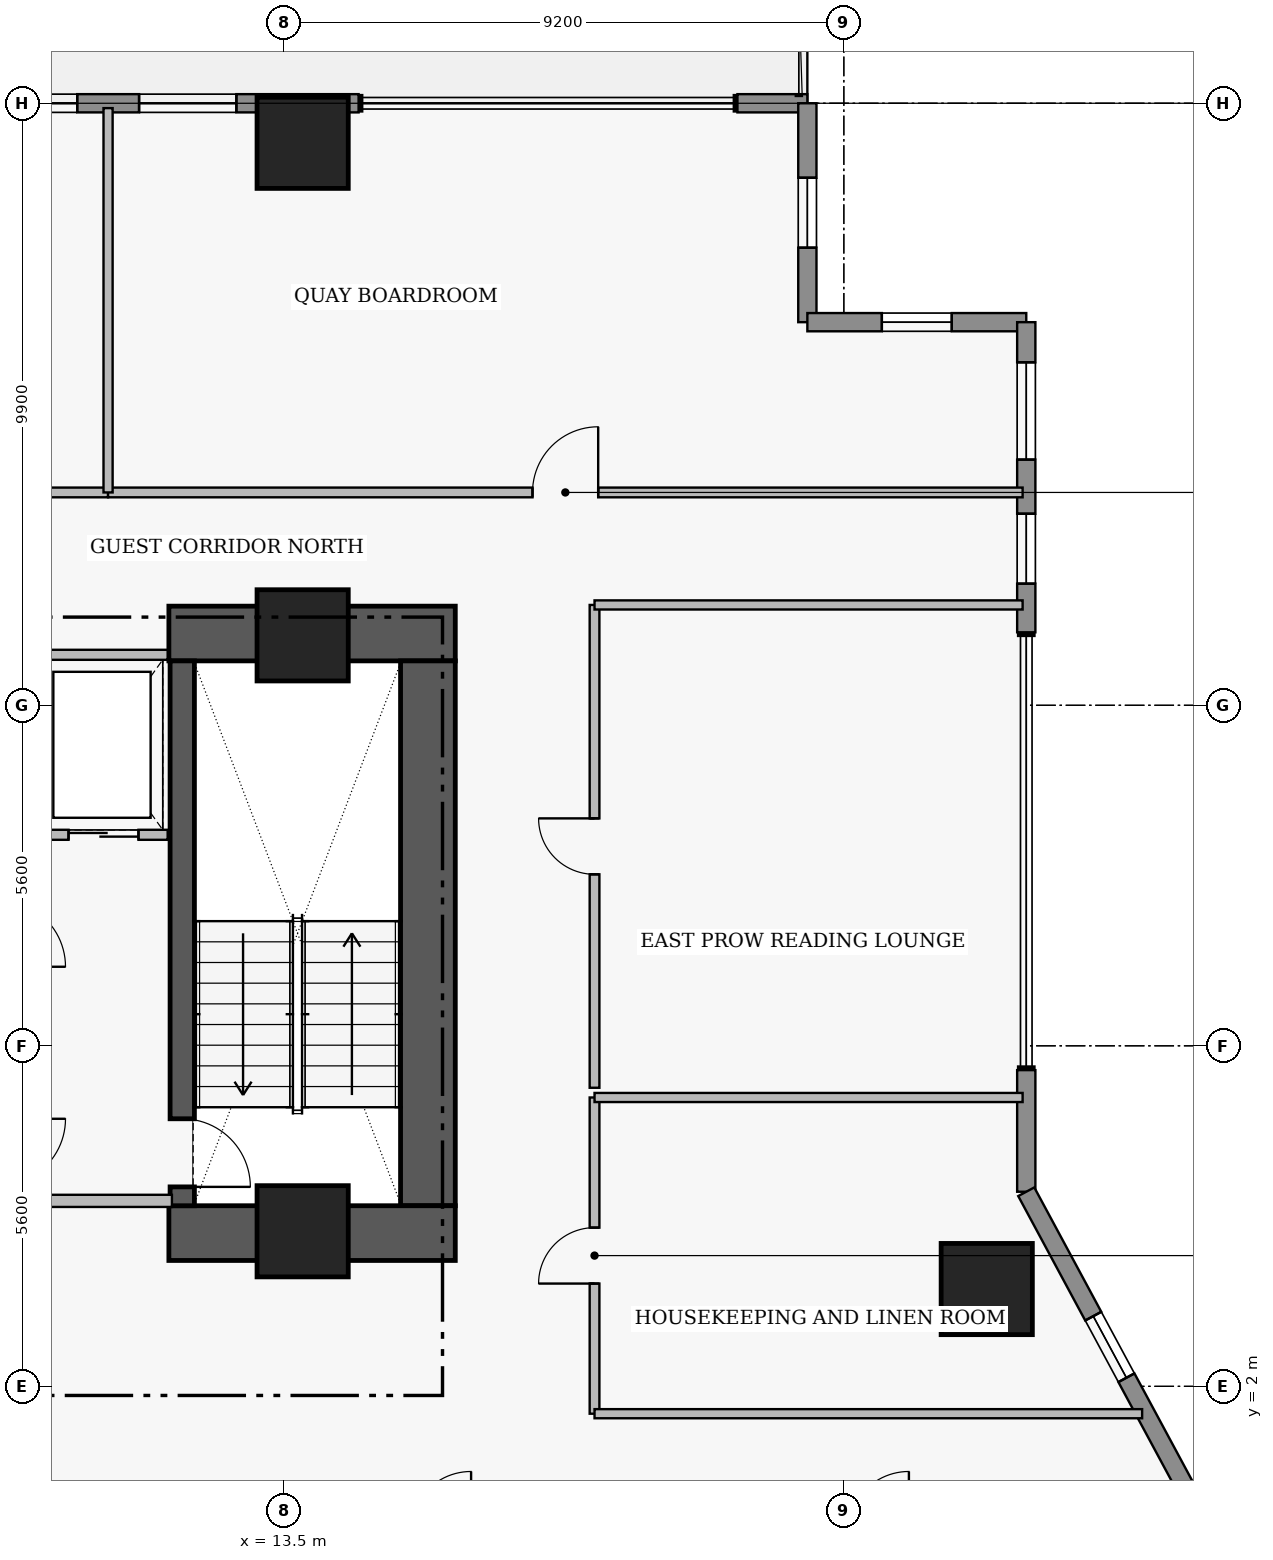
"""IFC4 building model, lengths in metres.
Left out: names, types, materials, properties, quantities, classifications, styles, units other than length and angle.
Written with IfcOpenShell. Run it as: python <this file> out.ifc"""

import sys

from ifc_helpers import new_model, si_unit, direction, frame, frame_2d, origin, origin_2d, place, context, subcontext, project, spatial, rectangle, extrude, element, fill, save


model = new_model("IFC4")
c1 = context("Model", 3, precision=1e-05, world=origin(), true_north=direction((0.0, 1.0)))
c2 = subcontext(c1, "Body", "Model", "MODEL_VIEW")
j1 = project(units=[si_unit("LENGTHUNIT", "METRE"), si_unit("PLANEANGLEUNIT", "RADIAN")], contexts=[c1])
p1 = place(None, origin())
s1 = spatial("IfcSite", under=j1, at=p1, CompositionType="ELEMENT")
p2 = place(p1, origin())
s2 = spatial("IfcBuilding", under=s1, at=p2, CompositionType="ELEMENT")
p3 = place(p2, frame((0.0, 0.0, 38.55)))
s3 = spatial("IfcBuildingStorey", under=s2, at=p3, CompositionType="ELEMENT", Elevation=38.55)
p4 = place(p3, frame((11.6, 14.38, 0.0), z_axis=(0.0, 0.0, 1.0), x_axis=(1.0, 0.0, 0.0)))
e1 = element("IfcWall", 1, at=p4, inside=s3, PredefinedType="SHEAR", context=c2, shape_type="SweptSolid", body=[
    extrude(rectangle(XDim=4.71, YDim=0.9, at=frame_2d((2.355, 0.0))), origin(), (0.0, 0.0, 1.0), 3.46),
])
p5 = place(p3, frame((15.86, 4.97, 0.0), z_axis=(0.0, 0.0, 1.0), x_axis=(0.0, 1.0, 0.0)))
e2 = element("IfcWall", 2, at=p5, inside=s3, PredefinedType="SHEAR", context=c2, shape_type="SweptSolid", body=[
    extrude(rectangle(XDim=8.96, YDim=0.9, at=frame_2d((4.48, 0.0))), origin(), (0.0, 0.0, 1.0), 3.46),
])
p6 = place(p3, frame((11.6, 4.52, 0.0), z_axis=(0.0, 0.0, 1.0), x_axis=(1.0, 0.0, 0.0)))
e3 = element("IfcWall", 3, at=p6, inside=s3, PredefinedType="SHEAR", context=c2, shape_type="SweptSolid", body=[
    extrude(rectangle(XDim=4.71, YDim=0.9, at=frame_2d((2.355, 0.0))), origin(), (0.0, 0.0, 1.0), 3.46),
])
p7 = place(p3, frame((11.82, 13.93, 0.0), z_axis=(0.0, 0.0, 1.0), x_axis=(0.0, -1.0, 0.0)))
e4 = element("IfcWall", 4, at=p7, inside=s3, PredefinedType="SHEAR", context=c2, shape_type="SweptSolid", body=[
    extrude(rectangle(XDim=8.96, YDim=0.4, at=frame_2d((4.48, 0.0))), origin(), (0.0, 0.0, 1.0), 3.46),
])
p8 = place(p7, frame((7.53, 0.0, 0.0)))
e5 = element("IfcOpeningElement", 5, at=p8, cuts=e4, PredefinedType="OPENING", context=c2, shape_type="SweptSolid", body=[
    extrude(rectangle(XDim=1.12, YDim=2.22, at=frame_2d((0.56, 1.11))), frame((0.0, 0.21, 0.0), z_axis=(0.0, -1.0, 0.0), x_axis=(1.0, 0.0, 0.0)), (0.0, 0.0, 1.0), 0.42),
])
for number, where, z_axis, x_axis in (
    (6, (13.8, 14.35, 0.0), (0.0, 0.0, 1.0), (1.0, 0.0, 0.0)),
    (7, (13.8, 4.55, 0.0), (0.0, 0.0, 1.0), (1.0, 0.0, 0.0)),
    (8, (13.8, 22.45, 0.0), (0.0, 0.0, 1.0), (1.0, 0.0, 0.0)),
    (9, (25.05, 3.6, 0.0), (0.0, 0.0, 1.0), (1.0, 0.0, 0.0)),
):
    element("IfcColumn", number, at=place(p3, frame(where, z_axis=z_axis, x_axis=x_axis)), inside=s3, PredefinedType="COLUMN", context=c2, shape_type="SweptSolid", body=[
        extrude(rectangle(XDim=1.5, YDim=1.5, at=origin_2d()), origin(), (0.0, 0.0, 1.0), 3.65),
    ])
p9 = place(p3, frame((-5.52, 23.1, 0.0), z_axis=(0.0, 0.0, 1.0), x_axis=(1.0, 0.0, 0.0)))
e10 = element("IfcWall", 10, at=p9, inside=s3, PredefinedType="STANDARD", context=c2, shape_type="SweptSolid", body=[
    extrude(rectangle(XDim=20.24, YDim=0.3, at=frame_2d((10.12, 0.0))), origin(), (0.0, 0.0, 1.0), 3.43),
])
p10 = place(p9, frame((12.775, 0.0, 0.0)))
e11 = element("IfcOpeningElement", 11, at=p10, cuts=e10, PredefinedType="OPENING", context=c2, shape_type="SweptSolid", body=[
    extrude(rectangle(XDim=1.05, YDim=2.2, at=frame_2d((0.525, 1.1))), frame((0.0, 0.16, 0.0), z_axis=(0.0, -1.0, 0.0), x_axis=(1.0, 0.0, 0.0)), (0.0, 0.0, 1.0), 0.32),
])
p11 = place(p9, frame((2.92, 0.0, 0.85)))
e12 = element("IfcOpeningElement", 12, at=p11, cuts=e10, PredefinedType="OPENING", context=c2, shape_type="SweptSolid", body=[
    extrude(rectangle(XDim=1.6, YDim=1.8, at=frame_2d((0.8, 0.9))), frame((0.0, 0.16, 0.0), z_axis=(0.0, -1.0, 0.0), x_axis=(1.0, 0.0, 0.0)), (0.0, 0.0, 1.0), 0.32),
])
p12 = place(p9, frame((5.11, 0.0, 0.95)))
e13 = element("IfcOpeningElement", 13, at=p12, cuts=e10, PredefinedType="OPENING", context=c2, shape_type="SweptSolid", body=[
    extrude(rectangle(XDim=1.15, YDim=1.55, at=frame_2d((0.575, 0.775))), frame((0.0, 0.16, 0.0), z_axis=(0.0, -1.0, 0.0), x_axis=(1.0, 0.0, 0.0)), (0.0, 0.0, 1.0), 0.32),
])
p13 = place(p9, frame((7.33, 0.0, 0.85)))
e14 = element("IfcOpeningElement", 14, at=p13, cuts=e10, PredefinedType="OPENING", context=c2, shape_type="SweptSolid", body=[
    extrude(rectangle(XDim=1.6, YDim=1.8, at=frame_2d((0.8, 0.9))), frame((0.0, 0.16, 0.0), z_axis=(0.0, -1.0, 0.0), x_axis=(1.0, 0.0, 0.0)), (0.0, 0.0, 1.0), 0.32),
])
p14 = place(p9, frame((11.097, 0.0, 0.95)))
e15 = element("IfcOpeningElement", 15, at=p14, cuts=e10, PredefinedType="OPENING", context=c2, shape_type="SweptSolid", body=[
    extrude(rectangle(XDim=1.15, YDim=1.55, at=frame_2d((0.575, 0.775))), frame((0.0, 0.16, 0.0), z_axis=(0.0, -1.0, 0.0), x_axis=(1.0, 0.0, 0.0)), (0.0, 0.0, 1.0), 0.32),
])
p15 = place(p9, frame((14.462, 0.0, 0.95)))
e16 = element("IfcOpeningElement", 16, at=p15, cuts=e10, PredefinedType="OPENING", context=c2, shape_type="SweptSolid", body=[
    extrude(rectangle(XDim=1.15, YDim=1.55, at=frame_2d((0.575, 0.775))), frame((0.0, 0.16, 0.0), z_axis=(0.0, -1.0, 0.0), x_axis=(1.0, 0.0, 0.0)), (0.0, 0.0, 1.0), 0.32),
])
p16 = place(p9, frame((16.63, 0.0, 0.85)))
e17 = element("IfcOpeningElement", 17, at=p16, cuts=e10, PredefinedType="OPENING", context=c2, shape_type="SweptSolid", body=[
    extrude(rectangle(XDim=1.6, YDim=1.8, at=frame_2d((0.8, 0.9))), frame((0.0, 0.16, 0.0), z_axis=(0.0, -1.0, 0.0), x_axis=(1.0, 0.0, 0.0)), (0.0, 0.0, 1.0), 0.32),
])
p17 = place(p3, frame((20.95, 23.1, 0.0), z_axis=(0.0, 0.0, 1.0), x_axis=(1.0, 0.0, 0.0)))
e18 = element("IfcWall", 18, at=p17, inside=s3, PredefinedType="STANDARD", context=c2, shape_type="SweptSolid", body=[
    extrude(rectangle(XDim=1.15, YDim=0.3, at=frame_2d((0.575, 0.0))), origin(), (0.0, 0.0, 1.0), 3.43),
])
p18 = place(p3, frame((22.1, 23.1, 0.0), z_axis=(0.0, 0.0, 1.0), x_axis=(0.0, -1.0, 0.0)))
e19 = element("IfcWall", 19, at=p18, inside=s3, PredefinedType="STANDARD", context=c2, shape_type="SweptSolid", body=[
    extrude(rectangle(XDim=3.6, YDim=0.3, at=frame_2d((1.8, 0.0))), origin(), (0.0, 0.0, 1.0), 3.43),
])
p19 = place(p18, frame((1.225, 0.0, 1.25)))
e20 = element("IfcOpeningElement", 20, at=p19, cuts=e19, PredefinedType="OPENING", context=c2, shape_type="SweptSolid", body=[
    extrude(rectangle(XDim=1.15, YDim=1.55, at=frame_2d((0.575, 0.775))), frame((0.0, 0.16, 0.0), z_axis=(0.0, -1.0, 0.0), x_axis=(1.0, 0.0, 0.0)), (0.0, 0.0, 1.0), 0.32),
])
p20 = place(p3, frame((22.1, 19.5, 0.0), z_axis=(0.0, 0.0, 1.0), x_axis=(1.0, 0.0, 0.0)))
e21 = element("IfcWall", 21, at=p20, inside=s3, PredefinedType="STANDARD", context=c2, shape_type="SweptSolid", body=[
    extrude(rectangle(XDim=3.6, YDim=0.3, at=frame_2d((1.8, 0.0))), origin(), (0.0, 0.0, 1.0), 3.43),
])
p21 = place(p20, frame((1.225, 0.0, 1.25)))
e22 = element("IfcOpeningElement", 22, at=p21, cuts=e21, PredefinedType="OPENING", context=c2, shape_type="SweptSolid", body=[
    extrude(rectangle(XDim=1.15, YDim=1.55, at=frame_2d((0.575, 0.775))), frame((0.0, 0.16, 0.0), z_axis=(0.0, -1.0, 0.0), x_axis=(1.0, 0.0, 0.0)), (0.0, 0.0, 1.0), 0.32),
])
p22 = place(p3, frame((25.7, 19.5, 0.0), z_axis=(0.0, 0.0, 1.0), x_axis=(0.0, -1.0, 0.0)))
e23 = element("IfcWall", 23, at=p22, inside=s3, PredefinedType="STANDARD", context=c2, shape_type="SweptSolid", body=[
    extrude(rectangle(XDim=5.1, YDim=0.3, at=frame_2d((2.55, 0.0))), origin(), (0.0, 0.0, 1.0), 3.43),
])
p23 = place(p22, frame((0.66, 0.0, 0.85)))
e24 = element("IfcOpeningElement", 24, at=p23, cuts=e23, PredefinedType="OPENING", context=c2, shape_type="SweptSolid", body=[
    extrude(rectangle(XDim=1.6, YDim=1.8, at=frame_2d((0.8, 0.9))), frame((0.0, 0.16, 0.0), z_axis=(0.0, -1.0, 0.0), x_axis=(1.0, 0.0, 0.0)), (0.0, 0.0, 1.0), 0.32),
])
p24 = place(p22, frame((3.15, 0.0, 0.95)))
e25 = element("IfcOpeningElement", 25, at=p24, cuts=e23, PredefinedType="OPENING", context=c2, shape_type="SweptSolid", body=[
    extrude(rectangle(XDim=1.15, YDim=1.55, at=frame_2d((0.575, 0.775))), frame((0.0, 0.16, 0.0), z_axis=(0.0, -1.0, 0.0), x_axis=(1.0, 0.0, 0.0)), (0.0, 0.0, 1.0), 0.32),
])
p25 = place(p3, frame((25.7, 7.2, 0.0), z_axis=(0.0, 0.0, 1.0), x_axis=(0.0, -1.0, 0.0)))
e26 = element("IfcWall", 26, at=p25, inside=s3, PredefinedType="STANDARD", context=c2, shape_type="SweptSolid", body=[
    extrude(rectangle(XDim=2.0, YDim=0.3, at=frame_2d((1.0, 0.0))), origin(), (0.0, 0.0, 1.0), 3.43),
])
p26 = place(p3, frame((25.7, 5.2, 0.0), z_axis=(0.0, 0.0, 1.0), x_axis=(0.474109683532, -0.880465790352, 0.0)))
e27 = element("IfcWall", 27, at=p26, inside=s3, PredefinedType="STANDARD", context=c2, shape_type="SweptSolid", body=[
    extrude(rectangle(XDim=5.906, YDim=0.3, at=frame_2d((2.953, 0.0))), origin(), (0.0, 0.0, 1.0), 3.43),
])
p27 = place(p26, frame((2.324, 0.0, 0.95)))
e28 = element("IfcOpeningElement", 28, at=p27, cuts=e27, PredefinedType="OPENING", context=c2, shape_type="SweptSolid", body=[
    extrude(rectangle(XDim=1.15, YDim=1.55, at=frame_2d((0.575, 0.775))), frame((0.0, 0.16, 0.0), z_axis=(0.0, -1.0, 0.0), x_axis=(1.0, 0.0, 0.0)), (0.0, 0.0, 1.0), 0.32),
])
p28 = place(p3, frame((9.42, 11.07, 0.0), z_axis=(0.0, 0.0, 1.0), x_axis=(1.0, 0.0, 0.0)))
e29 = element("IfcWall", 29, at=p28, inside=s3, PredefinedType="PARTITIONING", context=c2, shape_type="SweptSolid", body=[
    extrude(rectangle(XDim=2.16, YDim=0.165, at=frame_2d((1.08, 0.0))), origin(), (0.0, 0.0, 1.0), 3.43),
])
p29 = place(p28, frame((0.53, 0.0, 0.0)))
e30 = element("IfcOpeningElement", 30, at=p29, cuts=e29, PredefinedType="OPENING", context=c2, shape_type="SweptSolid", body=[
    extrude(rectangle(XDim=1.15, YDim=2.25, at=frame_2d((0.575, 1.125))), frame((0.0, 0.093, 0.0), z_axis=(0.0, -1.0, 0.0), x_axis=(1.0, 0.0, 0.0)), (0.0, 0.0, 1.0), 0.185),
])
p30 = place(p3, frame((1.2, 16.7, 0.0), z_axis=(0.0, 0.0, 1.0), x_axis=(1.0, 0.0, 0.0)))
e31 = element("IfcWall", 31, at=p30, inside=s3, PredefinedType="PARTITIONING", context=c2, shape_type="SweptSolid", body=[
    extrude(rectangle(XDim=9.4, YDim=0.16, at=frame_2d((4.7, 0.0))), origin(), (0.0, 0.0, 1.0), 2.973),
])
p31 = place(p30, frame((5.35, 0.0, 0.0)))
e32 = element("IfcOpeningElement", 32, at=p31, cuts=e31, PredefinedType="OPENING", context=c2, shape_type="SweptSolid", body=[
    extrude(rectangle(XDim=1.0, YDim=2.15, at=frame_2d((0.5, 1.075))), frame((0.0, 0.09, 0.0), z_axis=(0.0, -1.0, 0.0), x_axis=(1.0, 0.0, 0.0)), (0.0, 0.0, 1.0), 0.18),
])
p32 = place(p3, frame((10.6, 16.7, 0.0), z_axis=(0.0, 0.0, 1.0), x_axis=(1.0, 0.0, 0.0)))
e33 = element("IfcWall", 33, at=p32, inside=s3, PredefinedType="PARTITIONING", context=c2, shape_type="SweptSolid", body=[
    extrude(rectangle(XDim=15.04, YDim=0.16, at=frame_2d((7.52, 0.0))), origin(), (0.0, 0.0, 1.0), 2.973),
])
p33 = place(p32, frame((6.98, 0.0, 0.0)))
e34 = element("IfcOpeningElement", 34, at=p33, cuts=e33, PredefinedType="OPENING", context=c2, shape_type="SweptSolid", body=[
    extrude(rectangle(XDim=1.08, YDim=2.18, at=frame_2d((0.54, 1.09))), frame((0.0, 0.09, 0.0), z_axis=(0.0, -1.0, 0.0), x_axis=(1.0, 0.0, 0.0)), (0.0, 0.0, 1.0), 0.18),
])
p34 = place(p3, frame((18.6, 1.55, 0.0), z_axis=(0.0, 0.0, 1.0), x_axis=(0.0, 1.0, 0.0)))
e35 = element("IfcWall", 35, at=p34, inside=s3, PredefinedType="PARTITIONING", context=c2, shape_type="SweptSolid", body=[
    extrude(rectangle(XDim=5.2, YDim=0.16, at=frame_2d((2.6, 0.0))), origin(), (0.0, 0.0, 1.0), 3.43),
])
p35 = place(p34, frame((2.14, 0.0, 0.0)))
e36 = element("IfcOpeningElement", 36, at=p35, cuts=e35, PredefinedType="OPENING", context=c2, shape_type="SweptSolid", body=[
    extrude(rectangle(XDim=0.92, YDim=2.12, at=frame_2d((0.46, 1.06))), frame((0.0, 0.09, 0.0), z_axis=(0.0, -1.0, 0.0), x_axis=(1.0, 0.0, 0.0)), (0.0, 0.0, 1.0), 0.18),
])
p36 = place(p3, frame((18.6, 6.91, 0.0), z_axis=(0.0, 0.0, 1.0), x_axis=(0.0, 1.0, 0.0)))
e37 = element("IfcWall", 37, at=p36, inside=s3, PredefinedType="PARTITIONING", context=c2, shape_type="SweptSolid", body=[
    extrude(rectangle(XDim=7.94, YDim=0.16, at=frame_2d((3.97, 0.0))), origin(), (0.0, 0.0, 1.0), 3.43),
])
p37 = place(p36, frame((3.51, 0.0, 0.0)))
e38 = element("IfcOpeningElement", 38, at=p37, cuts=e37, PredefinedType="OPENING", context=c2, shape_type="SweptSolid", body=[
    extrude(rectangle(XDim=0.92, YDim=2.12, at=frame_2d((0.46, 1.06))), frame((0.0, 0.09, 0.0), z_axis=(0.0, -1.0, 0.0), x_axis=(1.0, 0.0, 0.0)), (0.0, 0.0, 1.0), 0.18),
])
p38 = place(p3, frame((8.8, 5.05, 0.0), z_axis=(0.0, 0.0, 1.0), x_axis=(1.0, 0.0, 0.0)))
e39 = element("IfcWall", 39, at=p38, inside=s3, PredefinedType="PARTITIONING", context=c2, shape_type="SweptSolid", body=[
    extrude(rectangle(XDim=2.85, YDim=0.2, at=frame_2d((1.425, 0.0))), origin(), (0.0, 0.0, 1.0), 3.43),
])
p39 = place(p3, frame((9.42, 14.03, 0.0), z_axis=(0.0, 0.0, 1.0), x_axis=(1.0, 0.0, 0.0)))
e40 = element("IfcWall", 40, at=p39, inside=s3, PredefinedType="PARTITIONING", context=c2, shape_type="SweptSolid", body=[
    extrude(rectangle(XDim=2.16, YDim=0.165, at=frame_2d((1.08, 0.0))), origin(), (0.0, 0.0, 1.0), 3.43),
])
p40 = place(p3, frame((10.6, 16.7, 0.0), z_axis=(0.0, 0.0, 1.0), x_axis=(0.0, 1.0, 0.0)))
e41 = element("IfcWall", 41, at=p40, inside=s3, PredefinedType="PARTITIONING", context=c2, shape_type="SweptSolid", body=[
    extrude(rectangle(XDim=6.32, YDim=0.15, at=frame_2d((3.16, 0.0))), origin(), (0.0, 0.0, 1.0), 3.43),
])
p41 = place(p3, frame((18.6, 1.55, 0.0), z_axis=(0.0, 0.0, 1.0), x_axis=(1.0, 0.0, 0.0)))
e42 = element("IfcWall", 42, at=p41, inside=s3, PredefinedType="PARTITIONING", context=c2, shape_type="SweptSolid", body=[
    extrude(rectangle(XDim=9.005, YDim=0.15, at=frame_2d((4.503, 0.0))), origin(), (0.0, 0.0, 1.0), 3.43),
])
for number, where, z_axis, x_axis in (
    (43, (18.6, 6.75, 0.0), (0.0, 0.0, 1.0), (1.0, 0.0, 0.0)),
    (44, (18.6, 14.85, 0.0), (0.0, 0.0, 1.0), (1.0, 0.0, 0.0)),
):
    element("IfcWall", number, at=place(p3, frame(where, z_axis=z_axis, x_axis=x_axis)), inside=s3, PredefinedType="PARTITIONING", context=c2, shape_type="SweptSolid", body=[
        extrude(rectangle(XDim=7.04, YDim=0.15, at=frame_2d((3.52, 0.0))), origin(), (0.0, 0.0, 1.0), 3.43),
    ])
p42 = place(p15, origin())
e45 = element("IfcWindow", 45, at=p42, inside=s3, PartitioningType="SINGLE_PANEL", PredefinedType="WINDOW", context=c2, shape_type="SweptSolid", body=[
    extrude(rectangle(XDim=1.15, YDim=1.55, at=frame_2d((0.575, 0.775))), frame((0.0, 0.03, 0.0), z_axis=(0.0, -1.0, 0.0), x_axis=(1.0, 0.0, 0.0)), (0.0, 0.0, 1.0), 0.06),
])
fill(e16, e45)
p43 = place(p16, origin())
e46 = element("IfcWindow", 46, at=p43, inside=s3, PartitioningType="SINGLE_PANEL", PredefinedType="WINDOW", context=c2, shape_type="SweptSolid", body=[
    extrude(rectangle(XDim=1.6, YDim=1.8, at=frame_2d((0.8, 0.9))), frame((0.0, 0.03, 0.0), z_axis=(0.0, -1.0, 0.0), x_axis=(1.0, 0.0, 0.0)), (0.0, 0.0, 1.0), 0.06),
])
fill(e17, e46)
p44 = place(p19, origin())
e47 = element("IfcWindow", 47, at=p44, inside=s3, PartitioningType="SINGLE_PANEL", PredefinedType="WINDOW", context=c2, shape_type="SweptSolid", body=[
    extrude(rectangle(XDim=1.15, YDim=1.55, at=frame_2d((0.575, 0.775))), frame((0.0, 0.03, 0.0), z_axis=(0.0, -1.0, 0.0), x_axis=(1.0, 0.0, 0.0)), (0.0, 0.0, 1.0), 0.06),
])
fill(e20, e47)
p45 = place(p21, origin())
e48 = element("IfcWindow", 48, at=p45, inside=s3, PartitioningType="SINGLE_PANEL", PredefinedType="WINDOW", context=c2, shape_type="SweptSolid", body=[
    extrude(rectangle(XDim=1.15, YDim=1.55, at=frame_2d((0.575, 0.775))), frame((0.0, 0.03, 0.0), z_axis=(0.0, -1.0, 0.0), x_axis=(1.0, 0.0, 0.0)), (0.0, 0.0, 1.0), 0.06),
])
fill(e22, e48)
p46 = place(p23, origin())
e49 = element("IfcWindow", 49, at=p46, inside=s3, PartitioningType="SINGLE_PANEL", PredefinedType="WINDOW", context=c2, shape_type="SweptSolid", body=[
    extrude(rectangle(XDim=1.6, YDim=1.8, at=frame_2d((0.8, 0.9))), frame((0.0, 0.03, 0.0), z_axis=(0.0, -1.0, 0.0), x_axis=(1.0, 0.0, 0.0)), (0.0, 0.0, 1.0), 0.06),
])
fill(e24, e49)
p47 = place(p24, origin())
e50 = element("IfcWindow", 50, at=p47, inside=s3, PartitioningType="SINGLE_PANEL", PredefinedType="WINDOW", context=c2, shape_type="SweptSolid", body=[
    extrude(rectangle(XDim=1.15, YDim=1.55, at=frame_2d((0.575, 0.775))), frame((0.0, 0.03, 0.0), z_axis=(0.0, -1.0, 0.0), x_axis=(1.0, 0.0, 0.0)), (0.0, 0.0, 1.0), 0.06),
])
fill(e25, e50)
p48 = place(p27, origin())
e51 = element("IfcWindow", 51, at=p48, inside=s3, PartitioningType="SINGLE_PANEL", PredefinedType="WINDOW", context=c2, shape_type="SweptSolid", body=[
    extrude(rectangle(XDim=1.15, YDim=1.55, at=frame_2d((0.575, 0.775))), frame((0.0, 0.03, 0.0), z_axis=(0.0, -1.0, 0.0), x_axis=(1.0, 0.0, 0.0)), (0.0, 0.0, 1.0), 0.06),
])
fill(e28, e51)
p49 = place(p8, origin())
e52 = element("IfcDoor", 52, at=p49, inside=s3, OperationType="SINGLE_SWING_RIGHT", PredefinedType="DOOR", context=c2, shape_type="SweptSolid", body=[
    extrude(rectangle(XDim=1.12, YDim=2.22, at=frame_2d((0.56, 1.11))), frame((0.0, 0.025, 0.0), z_axis=(0.0, -1.0, 0.0), x_axis=(1.0, 0.0, 0.0)), (0.0, 0.0, 1.0), 0.05),
])
fill(e5, e52)
p50 = place(p29, origin())
e53 = element("IfcDoor", 53, at=p50, inside=s3, OperationType="SLIDING_TO_LEFT", PredefinedType="DOOR", context=c2, shape_type="SweptSolid", body=[
    extrude(rectangle(XDim=1.15, YDim=2.25, at=frame_2d((0.575, 1.125))), frame((0.0, 0.025, 0.0), z_axis=(0.0, -1.0, 0.0), x_axis=(1.0, 0.0, 0.0)), (0.0, 0.0, 1.0), 0.05),
])
fill(e30, e53)
p51 = place(p33, origin())
e54 = element("IfcDoor", 54, at=p51, inside=s3, OperationType="SINGLE_SWING_RIGHT", PredefinedType="DOOR", context=c2, shape_type="SweptSolid", body=[
    extrude(rectangle(XDim=1.08, YDim=2.18, at=frame_2d((0.54, 1.09))), frame((0.0, 0.025, 0.0), z_axis=(0.0, -1.0, 0.0), x_axis=(1.0, 0.0, 0.0)), (0.0, 0.0, 1.0), 0.05),
])
fill(e34, e54)
p52 = place(p35, origin())
e55 = element("IfcDoor", 55, at=p52, inside=s3, OperationType="SINGLE_SWING_LEFT", PredefinedType="DOOR", context=c2, shape_type="SweptSolid", body=[
    extrude(rectangle(XDim=0.92, YDim=2.12, at=frame_2d((0.46, 1.06))), frame((0.0, 0.025, 0.0), z_axis=(0.0, -1.0, 0.0), x_axis=(1.0, 0.0, 0.0)), (0.0, 0.0, 1.0), 0.05),
])
fill(e36, e55)
p53 = place(p37, origin())
e56 = element("IfcDoor", 56, at=p53, inside=s3, OperationType="SINGLE_SWING_RIGHT", PredefinedType="DOOR", context=c2, shape_type="SweptSolid", body=[
    extrude(rectangle(XDim=0.92, YDim=2.12, at=frame_2d((0.46, 1.06))), frame((0.0, 0.025, 0.0), z_axis=(0.0, -1.0, 0.0), x_axis=(1.0, 0.0, 0.0)), (0.0, 0.0, 1.0), 0.05),
])
fill(e38, e56)
save(model, sys.argv[1])
